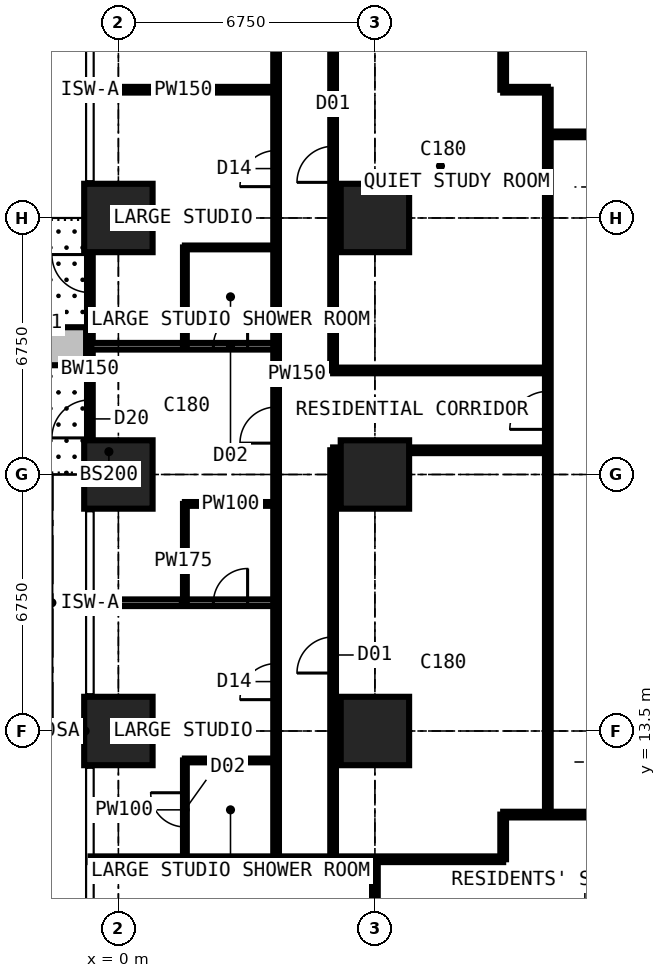
"""IFC4 building model, lengths in metres.
Left out: names, types, materials, properties, quantities, classifications, styles, units other than length and angle.
Written with IfcOpenShell. Run it as: python <this file> out.ifc"""

import sys

from ifc_helpers import new_model, si_unit, direction, frame, frame_2d, origin, origin_2d, place, context, subcontext, project, spatial, rectangle, extrude, element, fill, save


model = new_model("IFC4")
c1 = context("Model", 3, precision=1e-05, world=origin(), true_north=direction((0.0, 1.0)))
c2 = subcontext(c1, "Body", "Model", "MODEL_VIEW")
j1 = project(units=[si_unit("LENGTHUNIT", "METRE"), si_unit("PLANEANGLEUNIT", "RADIAN")], contexts=[c1])
p1 = place(None, origin())
s1 = spatial("IfcSite", under=j1, at=p1, CompositionType="ELEMENT")
p2 = place(p1, origin())
s2 = spatial("IfcBuilding", under=s1, at=p2, CompositionType="ELEMENT")
p3 = place(p2, frame((0.0, 0.0, 64.8)))
s3 = spatial("IfcBuildingStorey", under=s2, at=p3, CompositionType="ELEMENT", Elevation=64.8)
for number, where, z_axis, x_axis in (
    (1, (0.0, 13.5, 0.0), (0.0, 0.0, 1.0), (1.0, 0.0, 0.0)),
    (2, (0.0, 20.25, 0.0), (0.0, 0.0, 1.0), (1.0, 0.0, 0.0)),
    (3, (0.0, 27.0, 0.0), (0.0, 0.0, 1.0), (1.0, 0.0, 0.0)),
    (4, (6.75, 13.5, 0.0), (0.0, 0.0, 1.0), (1.0, 0.0, 0.0)),
    (5, (6.75, 20.25, 0.0), (0.0, 0.0, 1.0), (1.0, 0.0, 0.0)),
    (6, (6.75, 27.0, 0.0), (0.0, 0.0, 1.0), (1.0, 0.0, 0.0)),
):
    element("IfcColumn", number, at=place(p3, frame(where, z_axis=z_axis, x_axis=x_axis)), inside=s3, PredefinedType="COLUMN", context=c2, shape_type="SweptSolid", body=[
        extrude(rectangle(XDim=1.8, YDim=1.8, at=origin_2d()), origin(), (0.0, 0.0, 1.0), 3.6),
    ])
p4 = place(p3, frame((-0.75, 20.25, 0.0), z_axis=(0.0, 0.0, 1.0), x_axis=(0.0, 1.0, 0.0)))
e7 = element("IfcWall", 7, at=p4, inside=s3, PredefinedType="SOLIDWALL", context=c2, shape_type="SweptSolid", body=[
    extrude(rectangle(XDim=6.75, YDim=0.15, at=frame_2d((3.375, 0.0))), origin(), (0.0, 0.0, 1.0), 3.375),
])
p5 = place(p4, frame((0.962, 0.0, 0.0)))
e8 = element("IfcOpeningElement", 8, at=p5, cuts=e7, PredefinedType="OPENING", context=c2, shape_type="SweptSolid", body=[
    extrude(rectangle(XDim=1.0, YDim=2.2, at=frame_2d((0.5, 1.1))), frame((0.0, 0.085, 0.0), z_axis=(0.0, -1.0, 0.0), x_axis=(1.0, 0.0, 0.0)), (0.0, 0.0, 1.0), 0.17),
])
p6 = place(p4, frame((2.025, 0.0, 0.9)))
e9 = element("IfcOpeningElement", 9, at=p6, cuts=e7, PredefinedType="OPENING", context=c2, shape_type="SweptSolid", body=[
    extrude(rectangle(XDim=1.2, YDim=1.8, at=frame_2d((0.6, 0.9))), frame((0.0, 0.085, 0.0), z_axis=(0.0, -1.0, 0.0), x_axis=(1.0, 0.0, 0.0)), (0.0, 0.0, 1.0), 0.17),
])
p7 = place(p4, frame((4.788, 0.0, 0.0)))
e10 = element("IfcOpeningElement", 10, at=p7, cuts=e7, PredefinedType="OPENING", context=c2, shape_type="SweptSolid", body=[
    extrude(rectangle(XDim=1.0, YDim=2.2, at=frame_2d((0.5, 1.1))), frame((0.0, 0.085, 0.0), z_axis=(0.0, -1.0, 0.0), x_axis=(1.0, 0.0, 0.0)), (0.0, 0.0, 1.0), 0.17),
])
p8 = place(p4, frame((3.525, 0.0, 0.9)))
e11 = element("IfcOpeningElement", 11, at=p8, cuts=e7, PredefinedType="OPENING", context=c2, shape_type="SweptSolid", body=[
    extrude(rectangle(XDim=1.2, YDim=1.8, at=frame_2d((0.6, 0.9))), frame((0.0, 0.085, 0.0), z_axis=(0.0, -1.0, 0.0), x_axis=(1.0, 0.0, 0.0)), (0.0, 0.0, 1.0), 0.17),
])
p9 = place(p3, frame((-0.85, 23.625, 0.0), z_axis=(0.0, 0.0, 1.0), x_axis=(-1.0, 0.0, 0.0)))
e12 = element("IfcWall", 12, at=p9, inside=s3, PredefinedType="USERDEFINED", context=c2, shape_type="SweptSolid", body=[
    extrude(rectangle(XDim=2.2, YDim=1.0, at=frame_2d((1.1, 0.0))), origin(), (0.0, 0.0, 1.0), 0.9),
])
p10 = place(p3, frame((-0.734, 10.125, 0.0), z_axis=(0.0, 0.0, 1.0), x_axis=(1.0, 0.0, 0.0)))
e13 = element("IfcWall", 13, at=p10, inside=s3, PredefinedType="PARTITIONING", context=c2, shape_type="SweptSolid", body=[
    extrude(rectangle(XDim=10.859, YDim=0.15, at=frame_2d((5.429, 0.0))), origin(), (0.0, 0.0, 1.0), 3.375),
])
p11 = place(p3, frame((-0.734, 16.875, 0.0), z_axis=(0.0, 0.0, 1.0), x_axis=(1.0, 0.0, 0.0)))
e14 = element("IfcWall", 14, at=p11, inside=s3, PredefinedType="PARTITIONING", context=c2, shape_type="SweptSolid", body=[
    extrude(rectangle(XDim=4.884, YDim=0.175, at=frame_2d((2.442, 0.0))), origin(), (0.0, 0.0, 1.0), 3.375),
])
p12 = place(p11, frame((3.234, 0.0, 0.0)))
e15 = element("IfcOpeningElement", 15, at=p12, cuts=e14, PredefinedType="OPENING", context=c2, shape_type="SweptSolid", body=[
    extrude(rectangle(XDim=0.9, YDim=2.2, at=frame_2d((0.45, 1.1))), frame((0.0, 0.097, 0.0), z_axis=(0.0, -1.0, 0.0), x_axis=(1.0, 0.0, 0.0)), (0.0, 0.0, 1.0), 0.195),
])
p13 = place(p3, frame((-0.734, 23.625, 0.0), z_axis=(0.0, 0.0, 1.0), x_axis=(1.0, 0.0, 0.0)))
e16 = element("IfcWall", 16, at=p13, inside=s3, PredefinedType="PARTITIONING", context=c2, shape_type="SweptSolid", body=[
    extrude(rectangle(XDim=4.884, YDim=0.175, at=frame_2d((2.442, 0.0))), origin(), (0.0, 0.0, 1.0), 3.375),
])
p14 = place(p13, frame((3.234, 0.0, 0.0)))
e17 = element("IfcOpeningElement", 17, at=p14, cuts=e16, PredefinedType="OPENING", context=c2, shape_type="SweptSolid", body=[
    extrude(rectangle(XDim=0.9, YDim=2.2, at=frame_2d((0.45, 1.1))), frame((0.0, 0.097, 0.0), z_axis=(0.0, -1.0, 0.0), x_axis=(1.0, 0.0, 0.0)), (0.0, 0.0, 1.0), 0.195),
])
p15 = place(p3, frame((-0.734, 30.375, 0.0), z_axis=(0.0, 0.0, 1.0), x_axis=(1.0, 0.0, 0.0)))
e18 = element("IfcWall", 18, at=p15, inside=s3, PredefinedType="PARTITIONING", context=c2, shape_type="SweptSolid", body=[
    extrude(rectangle(XDim=4.884, YDim=0.15, at=frame_2d((2.442, 0.0))), origin(), (0.0, 0.0, 1.0), 3.375),
])
p16 = place(p3, frame((1.75, 10.125, 0.0), z_axis=(0.0, 0.0, 1.0), x_axis=(0.0, 1.0, 0.0)))
e19 = element("IfcWall", 19, at=p16, inside=s3, PredefinedType="PARTITIONING", context=c2, shape_type="SweptSolid", body=[
    extrude(rectangle(XDim=2.6, YDim=0.1, at=frame_2d((1.3, 0.0))), origin(), (0.0, 0.0, 1.0), 3.375),
])
p17 = place(p16, frame((0.85, 0.0, 0.0)))
e20 = element("IfcOpeningElement", 20, at=p17, cuts=e19, PredefinedType="OPENING", context=c2, shape_type="SweptSolid", body=[
    extrude(rectangle(XDim=0.9, YDim=2.2, at=frame_2d((0.45, 1.1))), frame((0.0, 0.06, 0.0), z_axis=(0.0, -1.0, 0.0), x_axis=(1.0, 0.0, 0.0)), (0.0, 0.0, 1.0), 0.12),
])
p18 = place(p3, frame((1.75, 12.725, 0.0), z_axis=(0.0, 0.0, 1.0), x_axis=(1.0, 0.0, 0.0)))
e21 = element("IfcWall", 21, at=p18, inside=s3, PredefinedType="PARTITIONING", context=c2, shape_type="SweptSolid", body=[
    extrude(rectangle(XDim=2.4, YDim=0.1, at=frame_2d((1.2, 0.0))), origin(), (0.0, 0.0, 1.0), 3.375),
])
p19 = place(p3, frame((1.75, 16.875, 0.0), z_axis=(0.0, 0.0, 1.0), x_axis=(0.0, 1.0, 0.0)))
e22 = element("IfcWall", 22, at=p19, inside=s3, PredefinedType="PARTITIONING", context=c2, shape_type="SweptSolid", body=[
    extrude(rectangle(XDim=2.6, YDim=0.1, at=frame_2d((1.3, 0.0))), origin(), (0.0, 0.0, 1.0), 3.375),
])
p20 = place(p3, frame((1.75, 19.475, 0.0), z_axis=(0.0, 0.0, 1.0), x_axis=(1.0, 0.0, 0.0)))
e23 = element("IfcWall", 23, at=p20, inside=s3, PredefinedType="PARTITIONING", context=c2, shape_type="SweptSolid", body=[
    extrude(rectangle(XDim=2.4, YDim=0.1, at=frame_2d((1.2, 0.0))), origin(), (0.0, 0.0, 1.0), 3.375),
])
p21 = place(p3, frame((1.75, 23.625, 0.0), z_axis=(0.0, 0.0, 1.0), x_axis=(0.0, 1.0, 0.0)))
e24 = element("IfcWall", 24, at=p21, inside=s3, PredefinedType="PARTITIONING", context=c2, shape_type="SweptSolid", body=[
    extrude(rectangle(XDim=2.6, YDim=0.1, at=frame_2d((1.3, 0.0))), origin(), (0.0, 0.0, 1.0), 3.375),
])
p22 = place(p3, frame((1.75, 26.225, 0.0), z_axis=(0.0, 0.0, 1.0), x_axis=(1.0, 0.0, 0.0)))
e25 = element("IfcWall", 25, at=p22, inside=s3, PredefinedType="PARTITIONING", context=c2, shape_type="SweptSolid", body=[
    extrude(rectangle(XDim=2.4, YDim=0.1, at=frame_2d((1.2, 0.0))), origin(), (0.0, 0.0, 1.0), 3.375),
])
p23 = place(p3, frame((4.15, 10.125, 0.0), z_axis=(0.0, 0.0, 1.0), x_axis=(0.0, 1.0, 0.0)))
e26 = element("IfcWall", 26, at=p23, inside=s3, PredefinedType="PARTITIONING", context=c2, shape_type="SweptSolid", body=[
    extrude(rectangle(XDim=23.625, YDim=0.15, at=frame_2d((11.812, 0.0))), origin(), (0.0, 0.0, 1.0), 3.375),
])
p24 = place(p23, frame((4.2, 0.0, 0.0)))
e27 = element("IfcOpeningElement", 27, at=p24, cuts=e26, PredefinedType="OPENING", context=c2, shape_type="SweptSolid", body=[
    extrude(rectangle(XDim=0.95, YDim=2.2, at=frame_2d((0.475, 1.1))), frame((0.0, 0.085, 0.0), z_axis=(0.0, -1.0, 0.0), x_axis=(1.0, 0.0, 0.0)), (0.0, 0.0, 1.0), 0.17),
])
p25 = place(p23, frame((10.95, 0.0, 0.0)))
e28 = element("IfcOpeningElement", 28, at=p25, cuts=e26, PredefinedType="OPENING", context=c2, shape_type="SweptSolid", body=[
    extrude(rectangle(XDim=0.95, YDim=2.2, at=frame_2d((0.475, 1.1))), frame((0.0, 0.085, 0.0), z_axis=(0.0, -1.0, 0.0), x_axis=(1.0, 0.0, 0.0)), (0.0, 0.0, 1.0), 0.17),
])
p26 = place(p23, frame((17.7, 0.0, 0.0)))
e29 = element("IfcOpeningElement", 29, at=p26, cuts=e26, PredefinedType="OPENING", context=c2, shape_type="SweptSolid", body=[
    extrude(rectangle(XDim=0.95, YDim=2.2, at=frame_2d((0.475, 1.1))), frame((0.0, 0.085, 0.0), z_axis=(0.0, -1.0, 0.0), x_axis=(1.0, 0.0, 0.0)), (0.0, 0.0, 1.0), 0.17),
])
p27 = place(p3, frame((5.65, 10.125, 0.0), z_axis=(0.0, 0.0, 1.0), x_axis=(0.0, 1.0, 0.0)))
e30 = element("IfcWall", 30, at=p27, inside=s3, PredefinedType="PARTITIONING", context=c2, shape_type="SweptSolid", body=[
    extrude(rectangle(XDim=10.762, YDim=0.15, at=frame_2d((5.381, 0.0))), origin(), (0.0, 0.0, 1.0), 3.375),
])
p28 = place(p27, frame((4.9, 0.0, 0.0)))
e31 = element("IfcOpeningElement", 31, at=p28, cuts=e30, PredefinedType="OPENING", context=c2, shape_type="SweptSolid", body=[
    extrude(rectangle(XDim=0.95, YDim=2.2, at=frame_2d((0.475, 1.1))), frame((0.0, 0.085, 0.0), z_axis=(0.0, -1.0, 0.0), x_axis=(1.0, 0.0, 0.0)), (0.0, 0.0, 1.0), 0.17),
])
p29 = place(p3, frame((5.65, 20.887, 0.0), z_axis=(0.0, 0.0, 1.0), x_axis=(1.0, 0.0, 0.0)))
e32 = element("IfcWall", 32, at=p29, inside=s3, PredefinedType="PARTITIONING", context=c2, shape_type="SweptSolid", body=[
    extrude(rectangle(XDim=5.65, YDim=0.15, at=frame_2d((2.825, 0.0))), origin(), (0.0, 0.0, 1.0), 3.375),
])
p30 = place(p3, frame((5.65, 22.988, 0.0), z_axis=(0.0, 0.0, 1.0), x_axis=(0.0, 1.0, 0.0)))
e33 = element("IfcWall", 33, at=p30, inside=s3, PredefinedType="PARTITIONING", context=c2, shape_type="SweptSolid", body=[
    extrude(rectangle(XDim=10.762, YDim=0.15, at=frame_2d((5.381, 0.0))), origin(), (0.0, 0.0, 1.0), 3.375),
])
p31 = place(p30, frame((4.95, 0.0, 0.0)))
e34 = element("IfcOpeningElement", 34, at=p31, cuts=e33, PredefinedType="OPENING", context=c2, shape_type="SweptSolid", body=[
    extrude(rectangle(XDim=0.95, YDim=2.2, at=frame_2d((0.475, 1.1))), frame((0.0, 0.085, 0.0), z_axis=(0.0, -1.0, 0.0), x_axis=(1.0, 0.0, 0.0)), (0.0, 0.0, 1.0), 0.17),
])
p32 = place(p3, frame((5.65, 22.988, 0.0), z_axis=(0.0, 0.0, 1.0), x_axis=(1.0, 0.0, 0.0)))
e35 = element("IfcWall", 35, at=p32, inside=s3, PredefinedType="PARTITIONING", context=c2, shape_type="SweptSolid", body=[
    extrude(rectangle(XDim=5.65, YDim=0.15, at=frame_2d((2.825, 0.0))), origin(), (0.0, 0.0, 1.0), 3.375),
])
p33 = place(p3, frame((6.75, 4.15, 0.0), z_axis=(0.0, 0.0, 1.0), x_axis=(0.0, 1.0, 0.0)))
e36 = element("IfcWall", 36, at=p33, inside=s3, PredefinedType="PARTITIONING", context=c2, shape_type="SweptSolid", body=[
    extrude(rectangle(XDim=5.975, YDim=0.15, at=frame_2d((2.988, 0.0))), origin(), (0.0, 0.0, 1.0), 2.877),
])
p34 = place(p3, frame((10.125, 10.125, 0.0), z_axis=(0.0, 0.0, 1.0), x_axis=(0.0, 1.0, 0.0)))
e37 = element("IfcWall", 37, at=p34, inside=s3, PredefinedType="PARTITIONING", context=c2, shape_type="SweptSolid", body=[
    extrude(rectangle(XDim=1.175, YDim=0.15, at=frame_2d((0.587, 0.0))), origin(), (0.0, 0.0, 1.0), 3.375),
])
p35 = place(p3, frame((10.125, 11.3, 0.0), z_axis=(0.0, 0.0, 1.0), x_axis=(1.0, 0.0, 0.0)))
e38 = element("IfcWall", 38, at=p35, inside=s3, PredefinedType="PARTITIONING", context=c2, shape_type="SweptSolid", body=[
    extrude(rectangle(XDim=20.675, YDim=0.15, at=frame_2d((10.337, 0.0))), origin(), (0.0, 0.0, 1.0), 3.375),
])
p36 = place(p35, frame((8.375, 0.0, 0.0)))
e39 = element("IfcOpeningElement", 39, at=p36, cuts=e38, PredefinedType="OPENING", context=c2, shape_type="SweptSolid", body=[
    extrude(rectangle(XDim=1.0, YDim=2.2, at=frame_2d((0.5, 1.1))), frame((0.0, 0.085, 0.0), z_axis=(0.0, -1.0, 0.0), x_axis=(1.0, 0.0, 0.0)), (0.0, 0.0, 1.0), 0.17),
])
p37 = place(p35, frame((10.975, 0.0, 0.0)))
e40 = element("IfcOpeningElement", 40, at=p37, cuts=e38, PredefinedType="OPENING", context=c2, shape_type="SweptSolid", body=[
    extrude(rectangle(XDim=1.0, YDim=2.2, at=frame_2d((0.5, 1.1))), frame((0.0, 0.085, 0.0), z_axis=(0.0, -1.0, 0.0), x_axis=(1.0, 0.0, 0.0)), (0.0, 0.0, 1.0), 0.17),
])
p38 = place(p35, frame((3.925, 0.0, 0.0)))
e41 = element("IfcOpeningElement", 41, at=p38, cuts=e38, PredefinedType="OPENING", context=c2, shape_type="SweptSolid", body=[
    extrude(rectangle(XDim=0.95, YDim=2.2, at=frame_2d((0.475, 1.1))), frame((0.0, 0.085, 0.0), z_axis=(0.0, -1.0, 0.0), x_axis=(1.0, 0.0, 0.0)), (0.0, 0.0, 1.0), 0.17),
])
p39 = place(p3, frame((10.125, 30.375, 0.0), z_axis=(0.0, 0.0, 1.0), x_axis=(0.0, 1.0, 0.0)))
e42 = element("IfcWall", 42, at=p39, inside=s3, PredefinedType="PARTITIONING", context=c2, shape_type="SweptSolid", body=[
    extrude(rectangle(XDim=10.859, YDim=0.15, at=frame_2d((5.429, 0.0))), origin(), (0.0, 0.0, 1.0), 3.375),
])
p40 = place(p39, frame((4.725, 0.0, 0.0)))
e43 = element("IfcOpeningElement", 43, at=p40, cuts=e42, PredefinedType="OPENING", context=c2, shape_type="SweptSolid", body=[
    extrude(rectangle(XDim=1.0, YDim=2.2, at=frame_2d((0.5, 1.1))), frame((0.0, 0.085, 0.0), z_axis=(0.0, -1.0, 0.0), x_axis=(1.0, 0.0, 0.0)), (0.0, 0.0, 1.0), 0.17),
])
p41 = place(p3, frame((10.125, 30.375, 0.0), z_axis=(0.0, 0.0, 1.0), x_axis=(1.0, 0.0, 0.0)))
e44 = element("IfcWall", 44, at=p41, inside=s3, PredefinedType="PARTITIONING", context=c2, shape_type="SweptSolid", body=[
    extrude(rectangle(XDim=1.175, YDim=0.15, at=frame_2d((0.587, 0.0))), origin(), (0.0, 0.0, 1.0), 3.375),
])
p42 = place(p3, frame((11.3, 11.3, 0.0), z_axis=(0.0, 0.0, 1.0), x_axis=(0.0, 1.0, 0.0)))
e45 = element("IfcWall", 45, at=p42, inside=s3, PredefinedType="PARTITIONING", context=c2, shape_type="SweptSolid", body=[
    extrude(rectangle(XDim=19.075, YDim=0.15, at=frame_2d((9.538, 0.0))), origin(), (0.0, 0.0, 1.0), 3.375),
])
p43 = place(p42, frame((10.137, 0.0, 0.0)))
e46 = element("IfcOpeningElement", 46, at=p43, cuts=e45, PredefinedType="OPENING", context=c2, shape_type="SweptSolid", body=[
    extrude(rectangle(XDim=1.0, YDim=2.2, at=frame_2d((0.5, 1.1))), frame((0.0, 0.085, 0.0), z_axis=(0.0, -1.0, 0.0), x_axis=(1.0, 0.0, 0.0)), (0.0, 0.0, 1.0), 0.17),
])
p44 = place(p3, frame((11.3, 29.2, 0.0), z_axis=(0.0, 0.0, 1.0), x_axis=(1.0, 0.0, 0.0)))
e47 = element("IfcWall", 47, at=p44, inside=s3, PredefinedType="PARTITIONING", context=c2, shape_type="SweptSolid", body=[
    extrude(rectangle(XDim=19.075, YDim=0.15, at=frame_2d((9.538, 0.0))), origin(), (0.0, 0.0, 1.0), 3.375),
])
p45 = place(p44, frame((10.137, 0.0, 0.0)))
e48 = element("IfcOpeningElement", 48, at=p45, cuts=e47, PredefinedType="OPENING", context=c2, shape_type="SweptSolid", body=[
    extrude(rectangle(XDim=1.0, YDim=2.2, at=frame_2d((0.5, 1.1))), frame((0.0, 0.085, 0.0), z_axis=(0.0, -1.0, 0.0), x_axis=(1.0, 0.0, 0.0)), (0.0, 0.0, 1.0), 0.17),
])
p46 = place(p5, origin())
e49 = element("IfcDoor", 49, at=p46, inside=s3, OperationType="SINGLE_SWING_LEFT", PredefinedType="DOOR", context=c2, shape_type="SweptSolid", body=[
    extrude(rectangle(XDim=1.0, YDim=2.2, at=frame_2d((0.5, 1.1))), frame((0.0, 0.025, 0.0), z_axis=(0.0, -1.0, 0.0), x_axis=(1.0, 0.0, 0.0)), (0.0, 0.0, 1.0), 0.05),
])
fill(e8, e49)
p47 = place(p6, origin())
e50 = element("IfcWindow", 50, at=p47, inside=s3, PartitioningType="SINGLE_PANEL", PredefinedType="WINDOW", context=c2, shape_type="SweptSolid", body=[
    extrude(rectangle(XDim=1.2, YDim=1.8, at=frame_2d((0.6, 0.9))), frame((0.0, 0.03, 0.0), z_axis=(0.0, -1.0, 0.0), x_axis=(1.0, 0.0, 0.0)), (0.0, 0.0, 1.0), 0.06),
])
fill(e9, e50)
p48 = place(p7, origin())
e51 = element("IfcDoor", 51, at=p48, inside=s3, OperationType="SINGLE_SWING_RIGHT", PredefinedType="DOOR", context=c2, shape_type="SweptSolid", body=[
    extrude(rectangle(XDim=1.0, YDim=2.2, at=frame_2d((0.5, 1.1))), frame((0.0, 0.025, 0.0), z_axis=(0.0, -1.0, 0.0), x_axis=(1.0, 0.0, 0.0)), (0.0, 0.0, 1.0), 0.05),
])
fill(e10, e51)
p49 = place(p8, origin())
e52 = element("IfcWindow", 52, at=p49, inside=s3, PartitioningType="SINGLE_PANEL", PredefinedType="WINDOW", context=c2, shape_type="SweptSolid", body=[
    extrude(rectangle(XDim=1.2, YDim=1.8, at=frame_2d((0.6, 0.9))), frame((0.0, 0.03, 0.0), z_axis=(0.0, -1.0, 0.0), x_axis=(1.0, 0.0, 0.0)), (0.0, 0.0, 1.0), 0.06),
])
fill(e11, e52)
p50 = place(p24, origin())
e53 = element("IfcDoor", 53, at=p50, inside=s3, OperationType="SINGLE_SWING_LEFT", PredefinedType="DOOR", context=c2, shape_type="SweptSolid", body=[
    extrude(rectangle(XDim=0.95, YDim=2.2, at=frame_2d((0.475, 1.1))), frame((0.0, 0.025, 0.0), z_axis=(0.0, -1.0, 0.0), x_axis=(1.0, 0.0, 0.0)), (0.0, 0.0, 1.0), 0.05),
])
fill(e27, e53)
p51 = place(p17, origin())
e54 = element("IfcDoor", 54, at=p51, inside=s3, OperationType="SINGLE_SWING_RIGHT", PredefinedType="DOOR", context=c2, shape_type="SweptSolid", body=[
    extrude(rectangle(XDim=0.9, YDim=2.2, at=frame_2d((0.45, 1.1))), frame((0.0, 0.025, 0.0), z_axis=(0.0, -1.0, 0.0), x_axis=(1.0, 0.0, 0.0)), (0.0, 0.0, 1.0), 0.05),
])
fill(e20, e54)
p52 = place(p25, origin())
e55 = element("IfcDoor", 55, at=p52, inside=s3, OperationType="SINGLE_SWING_LEFT", PredefinedType="DOOR", context=c2, shape_type="SweptSolid", body=[
    extrude(rectangle(XDim=0.95, YDim=2.2, at=frame_2d((0.475, 1.1))), frame((0.0, 0.025, 0.0), z_axis=(0.0, -1.0, 0.0), x_axis=(1.0, 0.0, 0.0)), (0.0, 0.0, 1.0), 0.05),
])
fill(e28, e55)
p53 = place(p12, origin())
e56 = element("IfcDoor", 56, at=p53, inside=s3, OperationType="SINGLE_SWING_RIGHT", PredefinedType="DOOR", context=c2, shape_type="SweptSolid", body=[
    extrude(rectangle(XDim=0.9, YDim=2.2, at=frame_2d((0.45, 1.1))), frame((0.0, 0.025, 0.0), z_axis=(0.0, -1.0, 0.0), x_axis=(1.0, 0.0, 0.0)), (0.0, 0.0, 1.0), 0.05),
])
fill(e15, e56)
p54 = place(p26, origin())
e57 = element("IfcDoor", 57, at=p54, inside=s3, OperationType="SINGLE_SWING_LEFT", PredefinedType="DOOR", context=c2, shape_type="SweptSolid", body=[
    extrude(rectangle(XDim=0.95, YDim=2.2, at=frame_2d((0.475, 1.1))), frame((0.0, 0.025, 0.0), z_axis=(0.0, -1.0, 0.0), x_axis=(1.0, 0.0, 0.0)), (0.0, 0.0, 1.0), 0.05),
])
fill(e29, e57)
p55 = place(p14, origin())
e58 = element("IfcDoor", 58, at=p55, inside=s3, OperationType="SINGLE_SWING_RIGHT", PredefinedType="DOOR", context=c2, shape_type="SweptSolid", body=[
    extrude(rectangle(XDim=0.9, YDim=2.2, at=frame_2d((0.45, 1.1))), frame((0.0, 0.025, 0.0), z_axis=(0.0, -1.0, 0.0), x_axis=(1.0, 0.0, 0.0)), (0.0, 0.0, 1.0), 0.05),
])
fill(e17, e58)
p56 = place(p43, origin())
e59 = element("IfcDoor", 59, at=p56, inside=s3, OperationType="SINGLE_SWING_LEFT", PredefinedType="DOOR", context=c2, shape_type="SweptSolid", body=[
    extrude(rectangle(XDim=1.0, YDim=2.2, at=frame_2d((0.5, 1.1))), frame((0.0, 0.025, 0.0), z_axis=(0.0, -1.0, 0.0), x_axis=(1.0, 0.0, 0.0)), (0.0, 0.0, 1.0), 0.05),
])
fill(e46, e59)
p57 = place(p28, origin())
e60 = element("IfcDoor", 60, at=p57, inside=s3, OperationType="SINGLE_SWING_LEFT", PredefinedType="DOOR", context=c2, shape_type="SweptSolid", body=[
    extrude(rectangle(XDim=0.95, YDim=2.2, at=frame_2d((0.475, 1.1))), frame((0.0, 0.025, 0.0), z_axis=(0.0, -1.0, 0.0), x_axis=(1.0, 0.0, 0.0)), (0.0, 0.0, 1.0), 0.05),
])
fill(e31, e60)
p58 = place(p31, origin())
e61 = element("IfcDoor", 61, at=p58, inside=s3, OperationType="SINGLE_SWING_LEFT", PredefinedType="DOOR", context=c2, shape_type="SweptSolid", body=[
    extrude(rectangle(XDim=0.95, YDim=2.2, at=frame_2d((0.475, 1.1))), frame((0.0, 0.025, 0.0), z_axis=(0.0, -1.0, 0.0), x_axis=(1.0, 0.0, 0.0)), (0.0, 0.0, 1.0), 0.05),
])
fill(e34, e61)
save(model, sys.argv[1])
